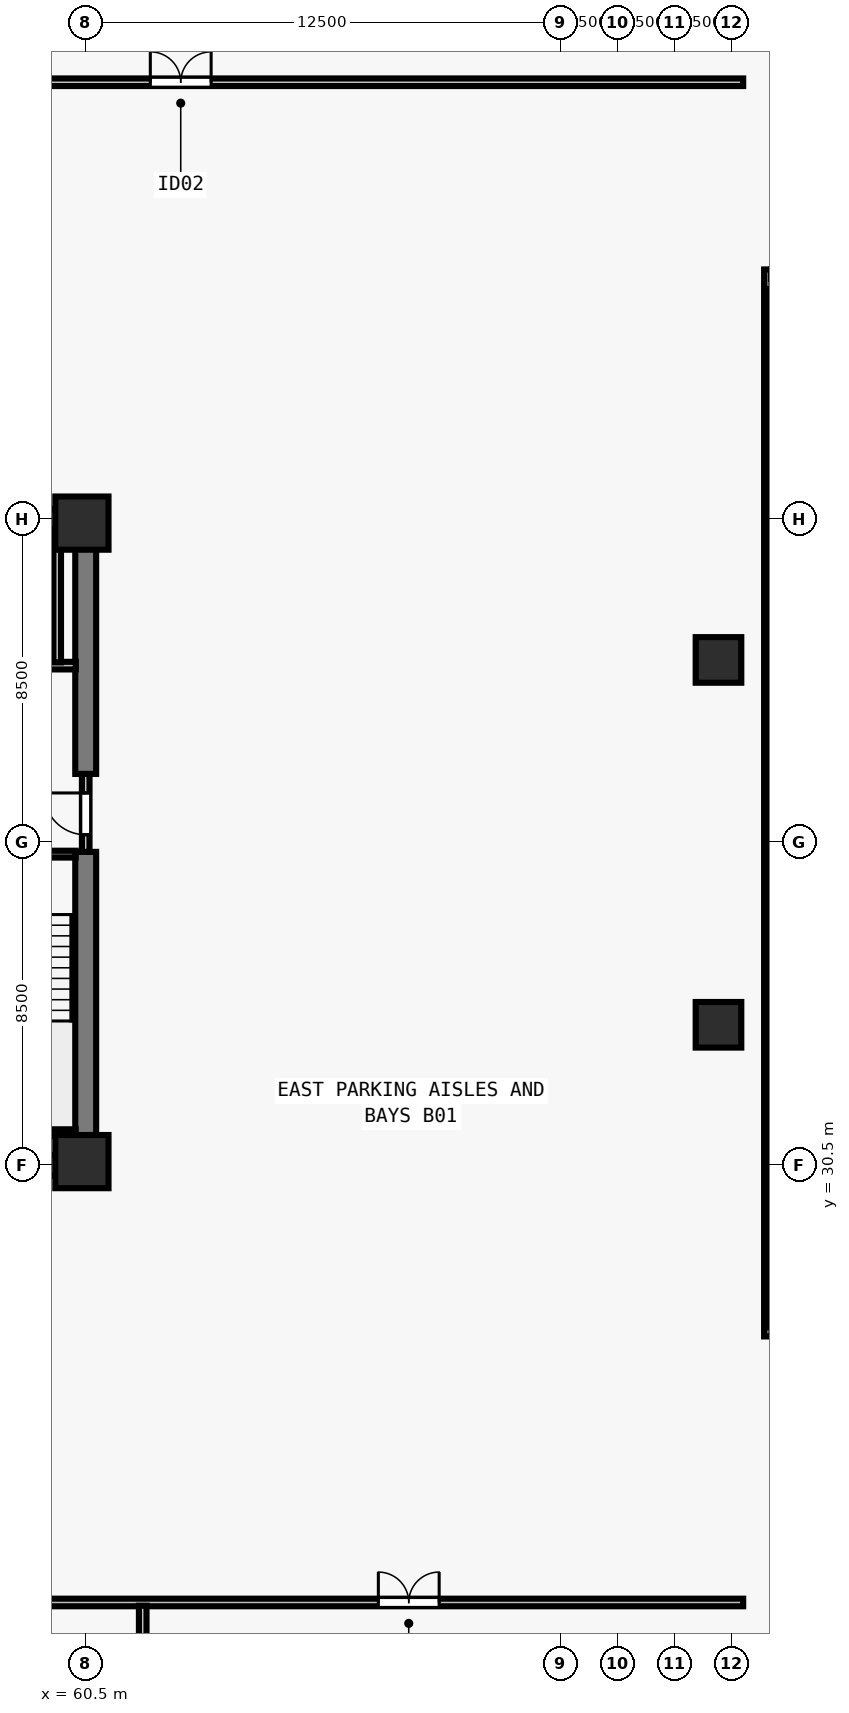
"""IFC4 building model, lengths in metres.
Left out: names, types, materials, properties, quantities, classifications, styles, units other than length and angle.
Written with IfcOpenShell. Run it as: python <this file> out.ifc"""

import sys

from ifc_helpers import new_model, si_unit, direction, frame, frame_2d, origin, origin_2d, place, context, subcontext, project, spatial, rectangle, extrude, element, fill, save


model = new_model("IFC4")
c1 = context("Model", 3, precision=1e-05, world=origin(), true_north=direction((0.0, 1.0)))
c2 = subcontext(c1, "Body", "Model", "MODEL_VIEW")
j1 = project(units=[si_unit("LENGTHUNIT", "METRE"), si_unit("PLANEANGLEUNIT", "RADIAN")], contexts=[c1])
p1 = place(None, origin())
s1 = spatial("IfcSite", under=j1, at=p1, CompositionType="ELEMENT")
p2 = place(p1, origin())
s2 = spatial("IfcBuilding", under=s1, at=p2, CompositionType="ELEMENT")
p3 = place(p2, frame((0.0, 0.0, -4.0)))
s3 = spatial("IfcBuildingStorey", under=s2, at=p3, CompositionType="ELEMENT", Elevation=-4.0)
for number, where, z_axis, x_axis in (
    (1, (60.4, 30.6, 0.0), (0.0, 0.0, 1.0), (1.0, 0.0, 0.0)),
    (2, (60.4, 47.4, 0.0), (0.0, 0.0, 1.0), (1.0, 0.0, 0.0)),
):
    element("IfcColumn", number, at=place(p3, frame(where, z_axis=z_axis, x_axis=x_axis)), inside=s3, PredefinedType="COLUMN", context=c2, shape_type="SweptSolid", body=[
        extrude(rectangle(XDim=1.4, YDim=1.4, at=origin_2d()), origin(), (0.0, 0.0, 1.0), 4.0),
    ])
for number, where, z_axis, x_axis in (
    (3, (77.15, 34.2, 0.0), (0.0, 0.0, 1.0), (1.0, 0.0, 0.0)),
    (4, (77.15, 43.8, 0.0), (0.0, 0.0, 1.0), (1.0, 0.0, 0.0)),
):
    element("IfcColumn", number, at=place(p3, frame(where, z_axis=z_axis, x_axis=x_axis)), inside=s3, PredefinedType="COLUMN", context=c2, shape_type="SweptSolid", body=[
        extrude(rectangle(XDim=1.2, YDim=1.2, at=origin_2d()), origin(), (0.0, 0.0, 1.0), 4.0),
    ])
for number, where, z_axis, x_axis in (
    (5, (43.225, 30.5, 0.0), (0.0, 0.0, 1.0), (1.0, 0.0, 0.0)),
    (6, (43.225, 47.5, 0.0), (0.0, 0.0, 1.0), (1.0, 0.0, 0.0)),
):
    element("IfcWall", number, at=place(p3, frame(where, z_axis=z_axis, x_axis=x_axis)), inside=s3, PredefinedType="SHEAR", context=c2, shape_type="SweptSolid", body=[
        extrude(rectangle(XDim=17.55, YDim=0.55, at=frame_2d((8.775, 0.0))), origin(), (0.0, 0.0, 1.0), 3.7),
    ])
p4 = place(p3, frame((60.5, 30.765, 0.0), z_axis=(0.0, 0.0, 1.0), x_axis=(0.0, 1.0, 0.0)))
e7 = element("IfcWall", 7, at=p4, inside=s3, PredefinedType="SHEAR", context=c2, shape_type="SweptSolid", body=[
    extrude(rectangle(XDim=7.985, YDim=0.55, at=frame_2d((3.993, 0.0))), origin(), (0.0, 0.0, 1.0), 3.7),
])
p5 = place(p3, frame((60.5, 40.8, 0.0), z_axis=(0.0, 0.0, 1.0), x_axis=(0.0, 1.0, 0.0)))
e8 = element("IfcWall", 8, at=p5, inside=s3, PredefinedType="SHEAR", context=c2, shape_type="SweptSolid", body=[
    extrude(rectangle(XDim=6.435, YDim=0.55, at=frame_2d((3.218, 0.0))), origin(), (0.0, 0.0, 1.0), 3.7),
])
p6 = place(p3, frame((60.5, 38.75, 0.0), z_axis=(0.0, 0.0, 1.0), x_axis=(0.0, 1.0, 0.0)))
e9 = element("IfcWall", 9, at=p6, inside=s3, PredefinedType="SOLIDWALL", context=c2, shape_type="SweptSolid", body=[
    extrude(rectangle(XDim=2.05, YDim=0.2, at=frame_2d((1.025, 0.0))), origin(), (0.0, 0.0, 1.0), 3.7),
])
p7 = place(p6, frame((0.45, 0.0, 0.0)))
e10 = element("IfcOpeningElement", 10, at=p7, cuts=e9, PredefinedType="OPENING", context=c2, shape_type="SweptSolid", body=[
    extrude(rectangle(XDim=1.1, YDim=2.15, at=frame_2d((0.55, 1.075))), frame((0.0, 0.11, 0.0), z_axis=(0.0, -1.0, 0.0), x_axis=(1.0, 0.0, 0.0)), (0.0, 0.0, 1.0), 0.22),
])
p8 = place(p3, frame((56.735, 43.65, 0.0), z_axis=(0.0, 0.0, 1.0), x_axis=(1.0, 0.0, 0.0)))
e11 = element("IfcWall", 11, at=p8, inside=s3, PredefinedType="SOLIDWALL", context=c2, shape_type="SweptSolid", body=[
    extrude(rectangle(XDim=3.505, YDim=0.2, at=frame_2d((1.752, 0.0))), origin(), (0.0, 0.0, 1.0), 3.7),
])
p9 = place(p8, frame((1.295, 0.0, 0.0)))
e12 = element("IfcOpeningElement", 12, at=p9, cuts=e11, PredefinedType="OPENING", context=c2, shape_type="SweptSolid", body=[
    extrude(rectangle(XDim=1.1, YDim=2.2, at=frame_2d((0.55, 1.1))), frame((0.0, 0.11, 0.0), z_axis=(0.0, -1.0, 0.0), x_axis=(1.0, 0.0, 0.0)), (0.0, 0.0, 1.0), 0.22),
])
p10 = place(p3, frame((59.75, 43.735, 0.0), z_axis=(0.0, 0.0, 1.0), x_axis=(0.0, 1.0, 0.0)))
e13 = element("IfcWall", 13, at=p10, inside=s3, PredefinedType="SOLIDWALL", context=c2, shape_type="SweptSolid", body=[
    extrude(rectangle(XDim=3.505, YDim=0.2, at=frame_2d((1.752, 0.0))), origin(), (0.0, 0.0, 1.0), 3.7),
])
p11 = place(p3, frame((26.2, 19.0, 0.0), z_axis=(0.0, 0.0, 1.0), x_axis=(1.0, 0.0, 0.0)))
e14 = element("IfcWall", 14, at=p11, inside=s3, PredefinedType="SOLIDWALL", context=c2, shape_type="SweptSolid", body=[
    extrude(rectangle(XDim=51.6, YDim=0.2, at=frame_2d((25.8, 0.0))), origin(), (0.0, 0.0, 1.0), 3.218),
])
p12 = place(p11, frame((8.0, 0.0, 0.0)))
e15 = element("IfcOpeningElement", 15, at=p12, cuts=e14, PredefinedType="OPENING", context=c2, shape_type="SweptSolid", body=[
    extrude(rectangle(XDim=1.6, YDim=2.2, at=frame_2d((0.8, 1.1))), frame((0.0, 0.11, 0.0), z_axis=(0.0, -1.0, 0.0), x_axis=(1.0, 0.0, 0.0)), (0.0, 0.0, 1.0), 0.22),
])
p13 = place(p11, frame((26.0, 0.0, 0.0)))
e16 = element("IfcOpeningElement", 16, at=p13, cuts=e14, PredefinedType="OPENING", context=c2, shape_type="SweptSolid", body=[
    extrude(rectangle(XDim=1.6, YDim=2.2, at=frame_2d((0.8, 1.1))), frame((0.0, 0.11, 0.0), z_axis=(0.0, -1.0, 0.0), x_axis=(1.0, 0.0, 0.0)), (0.0, 0.0, 1.0), 0.22),
])
p14 = place(p11, frame((42.0, 0.0, 0.0)))
e17 = element("IfcOpeningElement", 17, at=p14, cuts=e14, PredefinedType="OPENING", context=c2, shape_type="SweptSolid", body=[
    extrude(rectangle(XDim=1.6, YDim=2.2, at=frame_2d((0.8, 1.1))), frame((0.0, 0.11, 0.0), z_axis=(0.0, -1.0, 0.0), x_axis=(1.0, 0.0, 0.0)), (0.0, 0.0, 1.0), 0.22),
])
p15 = place(p3, frame((26.2, 59.0, 0.0), z_axis=(0.0, 0.0, 1.0), x_axis=(1.0, 0.0, 0.0)))
e18 = element("IfcWall", 18, at=p15, inside=s3, PredefinedType="SOLIDWALL", context=c2, shape_type="SweptSolid", body=[
    extrude(rectangle(XDim=51.6, YDim=0.2, at=frame_2d((25.8, 0.0))), origin(), (0.0, 0.0, 1.0), 3.218),
])
p16 = place(p15, frame((10.0, 0.0, 0.0)))
e19 = element("IfcOpeningElement", 19, at=p16, cuts=e18, PredefinedType="OPENING", context=c2, shape_type="SweptSolid", body=[
    extrude(rectangle(XDim=1.6, YDim=2.2, at=frame_2d((0.8, 1.1))), frame((0.0, 0.11, 0.0), z_axis=(0.0, -1.0, 0.0), x_axis=(1.0, 0.0, 0.0)), (0.0, 0.0, 1.0), 0.22),
])
p17 = place(p15, frame((36.0, 0.0, 0.0)))
e20 = element("IfcOpeningElement", 20, at=p17, cuts=e18, PredefinedType="OPENING", context=c2, shape_type="SweptSolid", body=[
    extrude(rectangle(XDim=1.6, YDim=2.2, at=frame_2d((0.8, 1.1))), frame((0.0, 0.11, 0.0), z_axis=(0.0, -1.0, 0.0), x_axis=(1.0, 0.0, 0.0)), (0.0, 0.0, 1.0), 0.22),
])
p18 = place(p3, frame((62.0, 13.4, 0.0), z_axis=(0.0, 0.0, 1.0), x_axis=(0.0, 1.0, 0.0)))
e21 = element("IfcWall", 21, at=p18, inside=s3, PredefinedType="SOLIDWALL", context=c2, shape_type="SweptSolid", body=[
    extrude(rectangle(XDim=5.515, YDim=0.2, at=frame_2d((2.758, 0.0))), origin(), (0.0, 0.0, 1.0), 3.7),
])
p19 = place(p3, frame((57.005, 38.69, 0.0), z_axis=(0.0, 0.0, 1.0), x_axis=(1.0, 0.0, 0.0)))
e22 = element("IfcWall", 22, at=p19, inside=s3, PredefinedType="SOLIDWALL", context=c2, shape_type="SweptSolid", body=[
    extrude(rectangle(XDim=3.23, YDim=0.18, at=frame_2d((1.615, 0.0))), origin(), (0.0, 0.0, 1.0), 3.7),
])
p20 = place(p19, frame((1.14, 0.0, 0.0)))
e23 = element("IfcOpeningElement", 23, at=p20, cuts=e22, PredefinedType="OPENING", context=c2, shape_type="SweptSolid", body=[
    extrude(rectangle(XDim=0.95, YDim=2.15, at=frame_2d((0.475, 1.075))), frame((0.0, 0.1, 0.0), z_axis=(0.0, -1.0, 0.0), x_axis=(1.0, 0.0, 0.0)), (0.0, 0.0, 1.0), 0.2),
])
p21 = place(p3, frame((57.005, 31.36, 0.0), z_axis=(0.0, 0.0, 1.0), x_axis=(1.0, 0.0, 0.0)))
e24 = element("IfcWall", 24, at=p21, inside=s3, PredefinedType="SOLIDWALL", context=c2, shape_type="SweptSolid", body=[
    extrude(rectangle(XDim=3.23, YDim=0.18, at=frame_2d((1.615, 0.0))), origin(), (0.0, 0.0, 1.0), 3.7),
])
p22 = place(p3, frame((78.45, 26.0, 0.0), z_axis=(0.0, 0.0, 1.0), x_axis=(0.0, 1.0, 0.0)))
e25 = element("IfcWall", 25, at=p22, inside=s3, PredefinedType="SOLIDWALL", context=c2, shape_type="SweptSolid", body=[
    extrude(rectangle(XDim=28.075, YDim=0.2, at=frame_2d((14.038, 0.0))), origin(), (0.0, 0.0, 1.0), 3.7),
])
p23 = place(p7, origin())
e26 = element("IfcDoor", 26, at=p23, inside=s3, OperationType="SINGLE_SWING_RIGHT", PredefinedType="DOOR", context=c2, shape_type="SweptSolid", body=[
    extrude(rectangle(XDim=1.1, YDim=2.15, at=frame_2d((0.55, 1.075))), frame((0.0, 0.025, 0.0), z_axis=(0.0, -1.0, 0.0), x_axis=(1.0, 0.0, 0.0)), (0.0, 0.0, 1.0), 0.05),
])
fill(e10, e26)
p24 = place(p14, origin())
e27 = element("IfcDoor", 27, at=p24, inside=s3, OperationType="DOUBLE_DOOR_SINGLE_SWING", PredefinedType="DOOR", context=c2, shape_type="SweptSolid", body=[
    extrude(rectangle(XDim=1.6, YDim=2.2, at=frame_2d((0.8, 1.1))), frame((0.0, 0.025, 0.0), z_axis=(0.0, -1.0, 0.0), x_axis=(1.0, 0.0, 0.0)), (0.0, 0.0, 1.0), 0.05),
])
fill(e17, e27)
p25 = place(p17, origin())
e28 = element("IfcDoor", 28, at=p25, inside=s3, OperationType="DOUBLE_DOOR_SINGLE_SWING", PredefinedType="DOOR", context=c2, shape_type="SweptSolid", body=[
    extrude(rectangle(XDim=1.6, YDim=2.2, at=frame_2d((0.8, 1.1))), frame((0.0, 0.025, 0.0), z_axis=(0.0, -1.0, 0.0), x_axis=(1.0, 0.0, 0.0)), (0.0, 0.0, 1.0), 0.05),
])
fill(e20, e28)
save(model, sys.argv[1])
